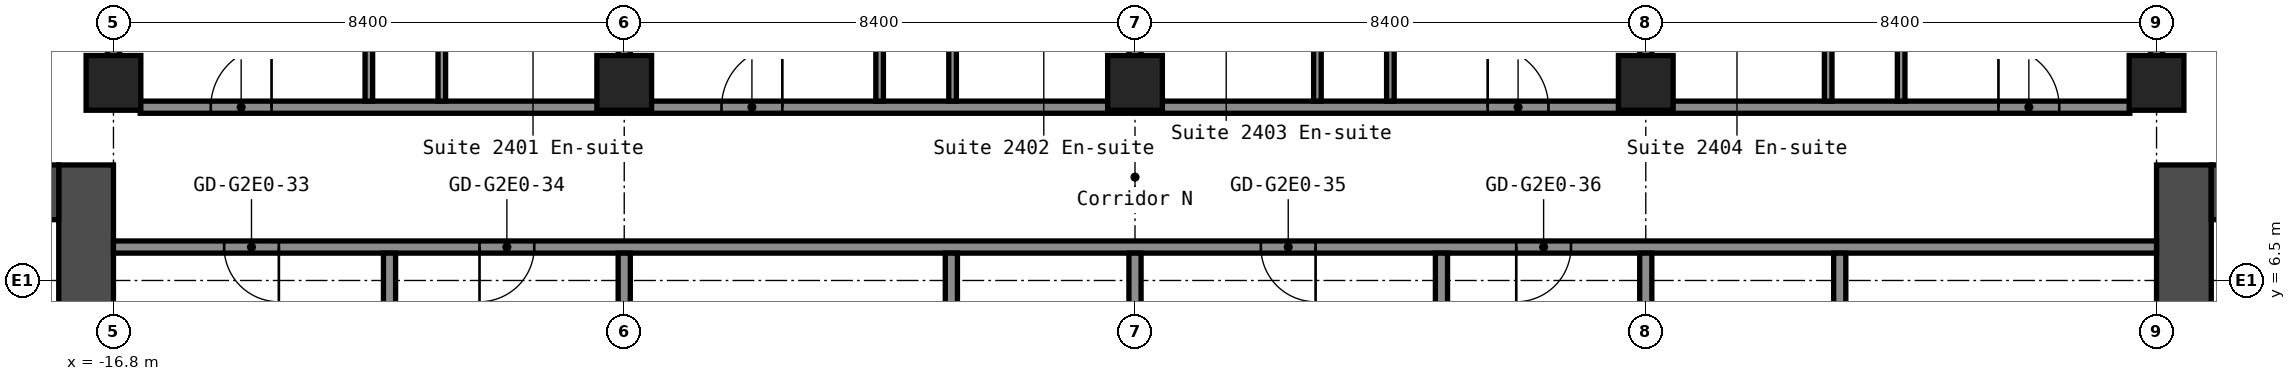
"""IFC4 building model, lengths in metres.
Left out: names, types, materials, properties, quantities, classifications, styles, units other than length and angle.
Written with IfcOpenShell. Run it as: python <this file> out.ifc"""

import sys

from ifc_helpers import new_model, si_unit, direction, frame, frame_2d, origin, origin_2d, place, context, subcontext, project, spatial, rectangle, hollow_rectangle, extrude, element, fill, save


model = new_model("IFC4")
c1 = context("Model", 3, precision=1e-05, world=origin(), true_north=direction((0.0, 1.0)))
c2 = subcontext(c1, "Body", "Model", "MODEL_VIEW")
j1 = project(units=[si_unit("LENGTHUNIT", "METRE"), si_unit("PLANEANGLEUNIT", "RADIAN")], contexts=[c1])
p1 = place(None, origin())
s1 = spatial("IfcSite", under=j1, at=p1, CompositionType="ELEMENT")
p2 = place(p1, origin())
s2 = spatial("IfcBuilding", under=s1, at=p2, CompositionType="ELEMENT")
p3 = place(p2, frame((0.0, 0.0, 88.2)))
s3 = spatial("IfcBuildingStorey", under=s2, at=p3, CompositionType="ELEMENT", Elevation=88.2)
for number, where, z_axis, x_axis in (
    (1, (-16.8, 9.75, 0.0), (0.0, 0.0, 1.0), (1.0, 0.0, 0.0)),
    (2, (-8.4, 9.75, 0.0), (0.0, 0.0, 1.0), (1.0, 0.0, 0.0)),
    (3, (0.0, 9.75, 0.0), (0.0, 0.0, 1.0), (1.0, 0.0, 0.0)),
    (4, (8.4, 9.75, 0.0), (0.0, 0.0, 1.0), (1.0, 0.0, 0.0)),
    (5, (16.8, 9.75, 0.0), (0.0, 0.0, 1.0), (1.0, 0.0, 0.0)),
):
    element("IfcColumn", number, at=place(p3, frame(where, z_axis=z_axis, x_axis=x_axis)), inside=s3, PredefinedType="COLUMN", context=c2, shape_type="SweptSolid", body=[
        extrude(hollow_rectangle(XDim=0.9, YDim=0.9, WallThickness=0.036, at=origin_2d()), origin(), (0.0, 0.0, 1.0), 2.8),
    ])
p4 = place(p3, frame((-17.25, -8.4, 0.0), z_axis=(0.0, 0.0, 1.0), x_axis=(0.0, 1.0, 0.0)))
e6 = element("IfcWall", 6, at=p4, inside=s3, PredefinedType="SHEAR", context=c2, shape_type="SweptSolid", body=[
    extrude(rectangle(XDim=16.8, YDim=0.9, at=frame_2d((8.4, 0.0))), origin(), (0.0, 0.0, 1.0), 2.8),
])
p5 = place(p4, frame((7.6, 0.0, 0.0)))
e7 = element("IfcOpeningElement", 7, at=p5, cuts=e6, PredefinedType="OPENING", context=c2, shape_type="SweptSolid", body=[
    extrude(rectangle(XDim=1.2, YDim=2.1, at=frame_2d((0.6, 1.05))), frame((0.0, 0.46, 0.0), z_axis=(0.0, -1.0, 0.0), x_axis=(1.0, 0.0, 0.0)), (0.0, 0.0, 1.0), 0.92),
])
p6 = place(p3, frame((-32.7, 7.95, 0.0), z_axis=(0.0, 0.0, 1.0), x_axis=(1.0, 0.0, 0.0)))
e8 = element("IfcWall", 8, at=p6, inside=s3, PredefinedType="SHEAR", context=c2, shape_type="SweptSolid", body=[
    extrude(rectangle(XDim=15.0, YDim=0.9, at=frame_2d((7.5, 0.0))), origin(), (0.0, 0.0, 1.0), 2.8),
])
p7 = place(p6, frame((3.4, 0.0, 0.0)))
e9 = element("IfcOpeningElement", 9, at=p7, cuts=e8, PredefinedType="OPENING", context=c2, shape_type="SweptSolid", body=[
    extrude(rectangle(XDim=1.2, YDim=2.1, at=frame_2d((0.6, 1.05))), frame((0.0, 0.46, 0.0), z_axis=(0.0, -1.0, 0.0), x_axis=(1.0, 0.0, 0.0)), (0.0, 0.0, 1.0), 0.92),
])
p8 = place(p6, frame((0.75, 0.0, 0.0)))
e10 = element("IfcOpeningElement", 10, at=p8, cuts=e8, PredefinedType="OPENING", context=c2, shape_type="SweptSolid", body=[
    extrude(rectangle(XDim=0.9, YDim=2.1, at=frame_2d((0.45, 1.05))), frame((0.0, 0.46, 0.0), z_axis=(0.0, -1.0, 0.0), x_axis=(1.0, 0.0, 0.0)), (0.0, 0.0, 1.0), 0.92),
])
p9 = place(p3, frame((17.25, -8.4, 0.0), z_axis=(0.0, 0.0, 1.0), x_axis=(0.0, 1.0, 0.0)))
e11 = element("IfcWall", 11, at=p9, inside=s3, PredefinedType="SHEAR", context=c2, shape_type="SweptSolid", body=[
    extrude(rectangle(XDim=16.8, YDim=0.9, at=frame_2d((8.4, 0.0))), origin(), (0.0, 0.0, 1.0), 2.8),
])
p10 = place(p9, frame((7.6, 0.0, 0.0)))
e12 = element("IfcOpeningElement", 12, at=p10, cuts=e11, PredefinedType="OPENING", context=c2, shape_type="SweptSolid", body=[
    extrude(rectangle(XDim=1.2, YDim=2.1, at=frame_2d((0.6, 1.05))), frame((0.0, 0.46, 0.0), z_axis=(0.0, -1.0, 0.0), x_axis=(1.0, 0.0, 0.0)), (0.0, 0.0, 1.0), 0.92),
])
p11 = place(p3, frame((17.7, 7.95, 0.0), z_axis=(0.0, 0.0, 1.0), x_axis=(1.0, 0.0, 0.0)))
e13 = element("IfcWall", 13, at=p11, inside=s3, PredefinedType="SHEAR", context=c2, shape_type="SweptSolid", body=[
    extrude(rectangle(XDim=15.0, YDim=0.9, at=frame_2d((7.5, 0.0))), origin(), (0.0, 0.0, 1.0), 2.8),
])
p12 = place(p11, frame((10.4, 0.0, 0.0)))
e14 = element("IfcOpeningElement", 14, at=p12, cuts=e13, PredefinedType="OPENING", context=c2, shape_type="SweptSolid", body=[
    extrude(rectangle(XDim=1.2, YDim=2.1, at=frame_2d((0.6, 1.05))), frame((0.0, 0.46, 0.0), z_axis=(0.0, -1.0, 0.0), x_axis=(1.0, 0.0, 0.0)), (0.0, 0.0, 1.0), 0.92),
])
p13 = place(p11, frame((13.35, 0.0, 0.0)))
e15 = element("IfcOpeningElement", 15, at=p13, cuts=e13, PredefinedType="OPENING", context=c2, shape_type="SweptSolid", body=[
    extrude(rectangle(XDim=0.9, YDim=2.1, at=frame_2d((0.45, 1.05))), frame((0.0, 0.46, 0.0), z_axis=(0.0, -1.0, 0.0), x_axis=(1.0, 0.0, 0.0)), (0.0, 0.0, 1.0), 0.92),
])
p14 = place(p3, frame((-16.8, 7.05, 0.0), z_axis=(0.0, 0.0, 1.0), x_axis=(1.0, 0.0, 0.0)))
e16 = element("IfcWall", 16, at=p14, inside=s3, PredefinedType="PARTITIONING", context=c2, shape_type="SweptSolid", body=[
    extrude(rectangle(XDim=33.6, YDim=0.2, at=frame_2d((16.8, 0.0))), origin(), (0.0, 0.0, 1.0), 2.8),
])
p15 = place(p14, frame((1.82, 0.0, 0.0)))
e17 = element("IfcOpeningElement", 17, at=p15, cuts=e16, PredefinedType="OPENING", context=c2, shape_type="SweptSolid", body=[
    extrude(rectangle(XDim=0.9, YDim=2.1, at=frame_2d((0.45, 1.05))), frame((0.0, 0.11, 0.0), z_axis=(0.0, -1.0, 0.0), x_axis=(1.0, 0.0, 0.0)), (0.0, 0.0, 1.0), 0.22),
])
p16 = place(p14, frame((6.02, 0.0, 0.0)))
e18 = element("IfcOpeningElement", 18, at=p16, cuts=e16, PredefinedType="OPENING", context=c2, shape_type="SweptSolid", body=[
    extrude(rectangle(XDim=0.9, YDim=2.1, at=frame_2d((0.45, 1.05))), frame((0.0, 0.11, 0.0), z_axis=(0.0, -1.0, 0.0), x_axis=(1.0, 0.0, 0.0)), (0.0, 0.0, 1.0), 0.22),
])
p17 = place(p14, frame((18.87, 0.0, 0.0)))
e19 = element("IfcOpeningElement", 19, at=p17, cuts=e16, PredefinedType="OPENING", context=c2, shape_type="SweptSolid", body=[
    extrude(rectangle(XDim=0.9, YDim=2.1, at=frame_2d((0.45, 1.05))), frame((0.0, 0.11, 0.0), z_axis=(0.0, -1.0, 0.0), x_axis=(1.0, 0.0, 0.0)), (0.0, 0.0, 1.0), 0.22),
])
p18 = place(p14, frame((23.07, 0.0, 0.0)))
e20 = element("IfcOpeningElement", 20, at=p18, cuts=e16, PredefinedType="OPENING", context=c2, shape_type="SweptSolid", body=[
    extrude(rectangle(XDim=0.9, YDim=2.1, at=frame_2d((0.45, 1.05))), frame((0.0, 0.11, 0.0), z_axis=(0.0, -1.0, 0.0), x_axis=(1.0, 0.0, 0.0)), (0.0, 0.0, 1.0), 0.22),
])
p19 = place(p3, frame((-16.36, 9.35, 0.0), z_axis=(0.0, 0.0, 1.0), x_axis=(1.0, 0.0, 0.0)))
e21 = element("IfcWall", 21, at=p19, inside=s3, PredefinedType="PARTITIONING", context=c2, shape_type="SweptSolid", body=[
    extrude(rectangle(XDim=32.72, YDim=0.2, at=frame_2d((16.36, 0.0))), origin(), (0.0, 0.0, 1.0), 2.8),
])
p20 = place(p19, frame((1.16, 0.0, 0.0)))
e22 = element("IfcOpeningElement", 22, at=p20, cuts=e21, PredefinedType="OPENING", context=c2, shape_type="SweptSolid", body=[
    extrude(rectangle(XDim=1.0, YDim=2.1, at=frame_2d((0.5, 1.05))), frame((0.0, 0.11, 0.0), z_axis=(0.0, -1.0, 0.0), x_axis=(1.0, 0.0, 0.0)), (0.0, 0.0, 1.0), 0.22),
])
p21 = place(p19, frame((9.56, 0.0, 0.0)))
e23 = element("IfcOpeningElement", 23, at=p21, cuts=e21, PredefinedType="OPENING", context=c2, shape_type="SweptSolid", body=[
    extrude(rectangle(XDim=1.0, YDim=2.1, at=frame_2d((0.5, 1.05))), frame((0.0, 0.11, 0.0), z_axis=(0.0, -1.0, 0.0), x_axis=(1.0, 0.0, 0.0)), (0.0, 0.0, 1.0), 0.22),
])
p22 = place(p19, frame((22.16, 0.0, 0.0)))
e24 = element("IfcOpeningElement", 24, at=p22, cuts=e21, PredefinedType="OPENING", context=c2, shape_type="SweptSolid", body=[
    extrude(rectangle(XDim=1.0, YDim=2.1, at=frame_2d((0.5, 1.05))), frame((0.0, 0.11, 0.0), z_axis=(0.0, -1.0, 0.0), x_axis=(1.0, 0.0, 0.0)), (0.0, 0.0, 1.0), 0.22),
])
p23 = place(p19, frame((30.56, 0.0, 0.0)))
e25 = element("IfcOpeningElement", 25, at=p23, cuts=e21, PredefinedType="OPENING", context=c2, shape_type="SweptSolid", body=[
    extrude(rectangle(XDim=1.0, YDim=2.1, at=frame_2d((0.5, 1.05))), frame((0.0, 0.11, 0.0), z_axis=(0.0, -1.0, 0.0), x_axis=(1.0, 0.0, 0.0)), (0.0, 0.0, 1.0), 0.22),
])
p24 = place(p3, frame((-16.8, 10.19, 0.0), z_axis=(0.0, 0.0, 1.0), x_axis=(0.0, 1.0, 0.0)))
e26 = element("IfcWall", 26, at=p24, inside=s3, PredefinedType="PARTITIONING", context=c2, shape_type="SweptSolid", body=[
    extrude(rectangle(XDim=13.36, YDim=0.2, at=frame_2d((6.68, 0.0))), origin(), (0.0, 0.0, 1.0), 2.8),
])
p25 = place(p3, frame((-12.6, 9.45, 0.0), z_axis=(0.0, 0.0, 1.0), x_axis=(0.0, 1.0, 0.0)))
e27 = element("IfcWall", 27, at=p25, inside=s3, PredefinedType="PARTITIONING", context=c2, shape_type="SweptSolid", body=[
    extrude(rectangle(XDim=14.1, YDim=0.125, at=frame_2d((7.05, 0.0))), origin(), (0.0, 0.0, 1.0), 2.8),
])
p26 = place(p25, frame((4.05, 0.0, 0.0)))
e28 = element("IfcOpeningElement", 28, at=p26, cuts=e27, PredefinedType="OPENING", context=c2, shape_type="SweptSolid", body=[
    extrude(rectangle(XDim=0.9, YDim=2.1, at=frame_2d((0.45, 1.05))), frame((0.0, 0.073, 0.0), z_axis=(0.0, -1.0, 0.0), x_axis=(1.0, 0.0, 0.0)), (0.0, 0.0, 1.0), 0.145),
])
p27 = place(p3, frame((-12.26, 1.05, 0.0), z_axis=(0.0, 0.0, 1.0), x_axis=(0.0, 1.0, 0.0)))
e29 = element("IfcWall", 29, at=p27, inside=s3, PredefinedType="PARTITIONING", context=c2, shape_type="SweptSolid", body=[
    extrude(rectangle(XDim=5.9, YDim=0.2, at=frame_2d((2.95, 0.0))), origin(), (0.0, 0.0, 1.0), 2.8),
])
p28 = place(p3, frame((-11.4, 9.45, 0.0), z_axis=(0.0, 0.0, 1.0), x_axis=(0.0, 1.0, 0.0)))
e30 = element("IfcWall", 30, at=p28, inside=s3, PredefinedType="PARTITIONING", context=c2, shape_type="SweptSolid", body=[
    extrude(rectangle(XDim=3.1, YDim=0.125, at=frame_2d((1.55, 0.0))), origin(), (0.0, 0.0, 1.0), 2.8),
])
p29 = place(p3, frame((-8.4, 1.05, 0.0), z_axis=(0.0, 0.0, 1.0), x_axis=(0.0, 1.0, 0.0)))
e31 = element("IfcWall", 31, at=p29, inside=s3, PredefinedType="PARTITIONING", context=c2, shape_type="SweptSolid", body=[
    extrude(rectangle(XDim=5.9, YDim=0.2, at=frame_2d((2.95, 0.0))), origin(), (0.0, 0.0, 1.0), 2.8),
])
p30 = place(p3, frame((-8.4, 10.19, 0.0), z_axis=(0.0, 0.0, 1.0), x_axis=(0.0, 1.0, 0.0)))
e32 = element("IfcWall", 32, at=p30, inside=s3, PredefinedType="PARTITIONING", context=c2, shape_type="SweptSolid", body=[
    extrude(rectangle(XDim=13.36, YDim=0.2, at=frame_2d((6.68, 0.0))), origin(), (0.0, 0.0, 1.0), 2.8),
])
p31 = place(p3, frame((-4.2, 9.45, 0.0), z_axis=(0.0, 0.0, 1.0), x_axis=(0.0, 1.0, 0.0)))
e33 = element("IfcWall", 33, at=p31, inside=s3, PredefinedType="PARTITIONING", context=c2, shape_type="SweptSolid", body=[
    extrude(rectangle(XDim=14.1, YDim=0.125, at=frame_2d((7.05, 0.0))), origin(), (0.0, 0.0, 1.0), 2.8),
])
p32 = place(p31, frame((4.05, 0.0, 0.0)))
e34 = element("IfcOpeningElement", 34, at=p32, cuts=e33, PredefinedType="OPENING", context=c2, shape_type="SweptSolid", body=[
    extrude(rectangle(XDim=0.9, YDim=2.1, at=frame_2d((0.45, 1.05))), frame((0.0, 0.073, 0.0), z_axis=(0.0, -1.0, 0.0), x_axis=(1.0, 0.0, 0.0)), (0.0, 0.0, 1.0), 0.145),
])
p33 = place(p3, frame((-3.02, 1.05, 0.0), z_axis=(0.0, 0.0, 1.0), x_axis=(0.0, 1.0, 0.0)))
e35 = element("IfcWall", 35, at=p33, inside=s3, PredefinedType="PARTITIONING", context=c2, shape_type="SweptSolid", body=[
    extrude(rectangle(XDim=5.9, YDim=0.2, at=frame_2d((2.95, 0.0))), origin(), (0.0, 0.0, 1.0), 2.8),
])
p34 = place(p3, frame((-3.0, 9.45, 0.0), z_axis=(0.0, 0.0, 1.0), x_axis=(0.0, 1.0, 0.0)))
e36 = element("IfcWall", 36, at=p34, inside=s3, PredefinedType="PARTITIONING", context=c2, shape_type="SweptSolid", body=[
    extrude(rectangle(XDim=3.1, YDim=0.125, at=frame_2d((1.55, 0.0))), origin(), (0.0, 0.0, 1.0), 2.8),
])
p35 = place(p3, frame((0.0, 1.05, 0.0), z_axis=(0.0, 0.0, 1.0), x_axis=(0.0, 1.0, 0.0)))
e37 = element("IfcWall", 37, at=p35, inside=s3, PredefinedType="PARTITIONING", context=c2, shape_type="SweptSolid", body=[
    extrude(rectangle(XDim=5.9, YDim=0.2, at=frame_2d((2.95, 0.0))), origin(), (0.0, 0.0, 1.0), 2.8),
])
p36 = place(p3, frame((0.0, 10.19, 0.0), z_axis=(0.0, 0.0, 1.0), x_axis=(0.0, 1.0, 0.0)))
e38 = element("IfcWall", 38, at=p36, inside=s3, PredefinedType="PARTITIONING", context=c2, shape_type="SweptSolid", body=[
    extrude(rectangle(XDim=13.36, YDim=0.2, at=frame_2d((6.68, 0.0))), origin(), (0.0, 0.0, 1.0), 2.8),
])
p37 = place(p3, frame((3.0, 9.45, 0.0), z_axis=(0.0, 0.0, 1.0), x_axis=(0.0, 1.0, 0.0)))
e39 = element("IfcWall", 39, at=p37, inside=s3, PredefinedType="PARTITIONING", context=c2, shape_type="SweptSolid", body=[
    extrude(rectangle(XDim=3.1, YDim=0.125, at=frame_2d((1.55, 0.0))), origin(), (0.0, 0.0, 1.0), 2.8),
])
p38 = place(p3, frame((4.2, 9.45, 0.0), z_axis=(0.0, 0.0, 1.0), x_axis=(0.0, 1.0, 0.0)))
e40 = element("IfcWall", 40, at=p38, inside=s3, PredefinedType="PARTITIONING", context=c2, shape_type="SweptSolid", body=[
    extrude(rectangle(XDim=14.1, YDim=0.125, at=frame_2d((7.05, 0.0))), origin(), (0.0, 0.0, 1.0), 2.8),
])
p39 = place(p38, frame((4.05, 0.0, 0.0)))
e41 = element("IfcOpeningElement", 41, at=p39, cuts=e40, PredefinedType="OPENING", context=c2, shape_type="SweptSolid", body=[
    extrude(rectangle(XDim=0.9, YDim=2.1, at=frame_2d((0.45, 1.05))), frame((0.0, 0.073, 0.0), z_axis=(0.0, -1.0, 0.0), x_axis=(1.0, 0.0, 0.0)), (0.0, 0.0, 1.0), 0.145),
])
for number, where, z_axis, x_axis in (
    (42, (5.04, 1.05, 0.0), (0.0, 0.0, 1.0), (0.0, 1.0, 0.0)),
    (43, (8.4, 1.05, 0.0), (0.0, 0.0, 1.0), (0.0, 1.0, 0.0)),
):
    element("IfcWall", number, at=place(p3, frame(where, z_axis=z_axis, x_axis=x_axis)), inside=s3, PredefinedType="PARTITIONING", context=c2, shape_type="SweptSolid", body=[
        extrude(rectangle(XDim=5.9, YDim=0.2, at=frame_2d((2.95, 0.0))), origin(), (0.0, 0.0, 1.0), 2.8),
    ])
p40 = place(p3, frame((8.4, 10.19, 0.0), z_axis=(0.0, 0.0, 1.0), x_axis=(0.0, 1.0, 0.0)))
e44 = element("IfcWall", 44, at=p40, inside=s3, PredefinedType="PARTITIONING", context=c2, shape_type="SweptSolid", body=[
    extrude(rectangle(XDim=13.36, YDim=0.2, at=frame_2d((6.68, 0.0))), origin(), (0.0, 0.0, 1.0), 2.8),
])
p41 = place(p3, frame((11.4, 9.45, 0.0), z_axis=(0.0, 0.0, 1.0), x_axis=(0.0, 1.0, 0.0)))
e45 = element("IfcWall", 45, at=p41, inside=s3, PredefinedType="PARTITIONING", context=c2, shape_type="SweptSolid", body=[
    extrude(rectangle(XDim=3.1, YDim=0.125, at=frame_2d((1.55, 0.0))), origin(), (0.0, 0.0, 1.0), 2.8),
])
p42 = place(p3, frame((11.59, 1.05, 0.0), z_axis=(0.0, 0.0, 1.0), x_axis=(0.0, 1.0, 0.0)))
e46 = element("IfcWall", 46, at=p42, inside=s3, PredefinedType="PARTITIONING", context=c2, shape_type="SweptSolid", body=[
    extrude(rectangle(XDim=5.9, YDim=0.2, at=frame_2d((2.95, 0.0))), origin(), (0.0, 0.0, 1.0), 2.8),
])
p43 = place(p3, frame((12.6, 9.45, 0.0), z_axis=(0.0, 0.0, 1.0), x_axis=(0.0, 1.0, 0.0)))
e47 = element("IfcWall", 47, at=p43, inside=s3, PredefinedType="PARTITIONING", context=c2, shape_type="SweptSolid", body=[
    extrude(rectangle(XDim=14.1, YDim=0.125, at=frame_2d((7.05, 0.0))), origin(), (0.0, 0.0, 1.0), 2.8),
])
p44 = place(p43, frame((4.05, 0.0, 0.0)))
e48 = element("IfcOpeningElement", 48, at=p44, cuts=e47, PredefinedType="OPENING", context=c2, shape_type="SweptSolid", body=[
    extrude(rectangle(XDim=0.9, YDim=2.1, at=frame_2d((0.45, 1.05))), frame((0.0, 0.073, 0.0), z_axis=(0.0, -1.0, 0.0), x_axis=(1.0, 0.0, 0.0)), (0.0, 0.0, 1.0), 0.145),
])
p45 = place(p3, frame((16.8, 10.19, 0.0), z_axis=(0.0, 0.0, 1.0), x_axis=(0.0, 1.0, 0.0)))
e49 = element("IfcWall", 49, at=p45, inside=s3, PredefinedType="PARTITIONING", context=c2, shape_type="SweptSolid", body=[
    extrude(rectangle(XDim=13.36, YDim=0.2, at=frame_2d((6.68, 0.0))), origin(), (0.0, 0.0, 1.0), 2.8),
])
p46 = place(p15, origin())
e50 = element("IfcDoor", 50, at=p46, inside=s3, OperationType="SINGLE_SWING_RIGHT", PredefinedType="DOOR", context=c2, shape_type="SweptSolid", body=[
    extrude(rectangle(XDim=0.9, YDim=2.1, at=frame_2d((0.45, 1.05))), frame((0.0, 0.025, 0.0), z_axis=(0.0, -1.0, 0.0), x_axis=(1.0, 0.0, 0.0)), (0.0, 0.0, 1.0), 0.05),
])
fill(e17, e50)
p47 = place(p16, origin())
e51 = element("IfcDoor", 51, at=p47, inside=s3, OperationType="SINGLE_SWING_LEFT", PredefinedType="DOOR", context=c2, shape_type="SweptSolid", body=[
    extrude(rectangle(XDim=0.9, YDim=2.1, at=frame_2d((0.45, 1.05))), frame((0.0, 0.025, 0.0), z_axis=(0.0, -1.0, 0.0), x_axis=(1.0, 0.0, 0.0)), (0.0, 0.0, 1.0), 0.05),
])
fill(e18, e51)
p48 = place(p17, origin())
e52 = element("IfcDoor", 52, at=p48, inside=s3, OperationType="SINGLE_SWING_RIGHT", PredefinedType="DOOR", context=c2, shape_type="SweptSolid", body=[
    extrude(rectangle(XDim=0.9, YDim=2.1, at=frame_2d((0.45, 1.05))), frame((0.0, 0.025, 0.0), z_axis=(0.0, -1.0, 0.0), x_axis=(1.0, 0.0, 0.0)), (0.0, 0.0, 1.0), 0.05),
])
fill(e19, e52)
p49 = place(p18, origin())
e53 = element("IfcDoor", 53, at=p49, inside=s3, OperationType="SINGLE_SWING_LEFT", PredefinedType="DOOR", context=c2, shape_type="SweptSolid", body=[
    extrude(rectangle(XDim=0.9, YDim=2.1, at=frame_2d((0.45, 1.05))), frame((0.0, 0.025, 0.0), z_axis=(0.0, -1.0, 0.0), x_axis=(1.0, 0.0, 0.0)), (0.0, 0.0, 1.0), 0.05),
])
fill(e20, e53)
p50 = place(p20, origin())
e54 = element("IfcDoor", 54, at=p50, inside=s3, OperationType="SINGLE_SWING_LEFT", PredefinedType="DOOR", context=c2, shape_type="SweptSolid", body=[
    extrude(rectangle(XDim=1.0, YDim=2.1, at=frame_2d((0.5, 1.05))), frame((0.0, 0.025, 0.0), z_axis=(0.0, -1.0, 0.0), x_axis=(1.0, 0.0, 0.0)), (0.0, 0.0, 1.0), 0.05),
])
fill(e22, e54)
p51 = place(p21, origin())
e55 = element("IfcDoor", 55, at=p51, inside=s3, OperationType="SINGLE_SWING_LEFT", PredefinedType="DOOR", context=c2, shape_type="SweptSolid", body=[
    extrude(rectangle(XDim=1.0, YDim=2.1, at=frame_2d((0.5, 1.05))), frame((0.0, 0.025, 0.0), z_axis=(0.0, -1.0, 0.0), x_axis=(1.0, 0.0, 0.0)), (0.0, 0.0, 1.0), 0.05),
])
fill(e23, e55)
p52 = place(p22, origin())
e56 = element("IfcDoor", 56, at=p52, inside=s3, OperationType="SINGLE_SWING_RIGHT", PredefinedType="DOOR", context=c2, shape_type="SweptSolid", body=[
    extrude(rectangle(XDim=1.0, YDim=2.1, at=frame_2d((0.5, 1.05))), frame((0.0, 0.025, 0.0), z_axis=(0.0, -1.0, 0.0), x_axis=(1.0, 0.0, 0.0)), (0.0, 0.0, 1.0), 0.05),
])
fill(e24, e56)
p53 = place(p23, origin())
e57 = element("IfcDoor", 57, at=p53, inside=s3, OperationType="SINGLE_SWING_RIGHT", PredefinedType="DOOR", context=c2, shape_type="SweptSolid", body=[
    extrude(rectangle(XDim=1.0, YDim=2.1, at=frame_2d((0.5, 1.05))), frame((0.0, 0.025, 0.0), z_axis=(0.0, -1.0, 0.0), x_axis=(1.0, 0.0, 0.0)), (0.0, 0.0, 1.0), 0.05),
])
fill(e25, e57)
save(model, sys.argv[1])
